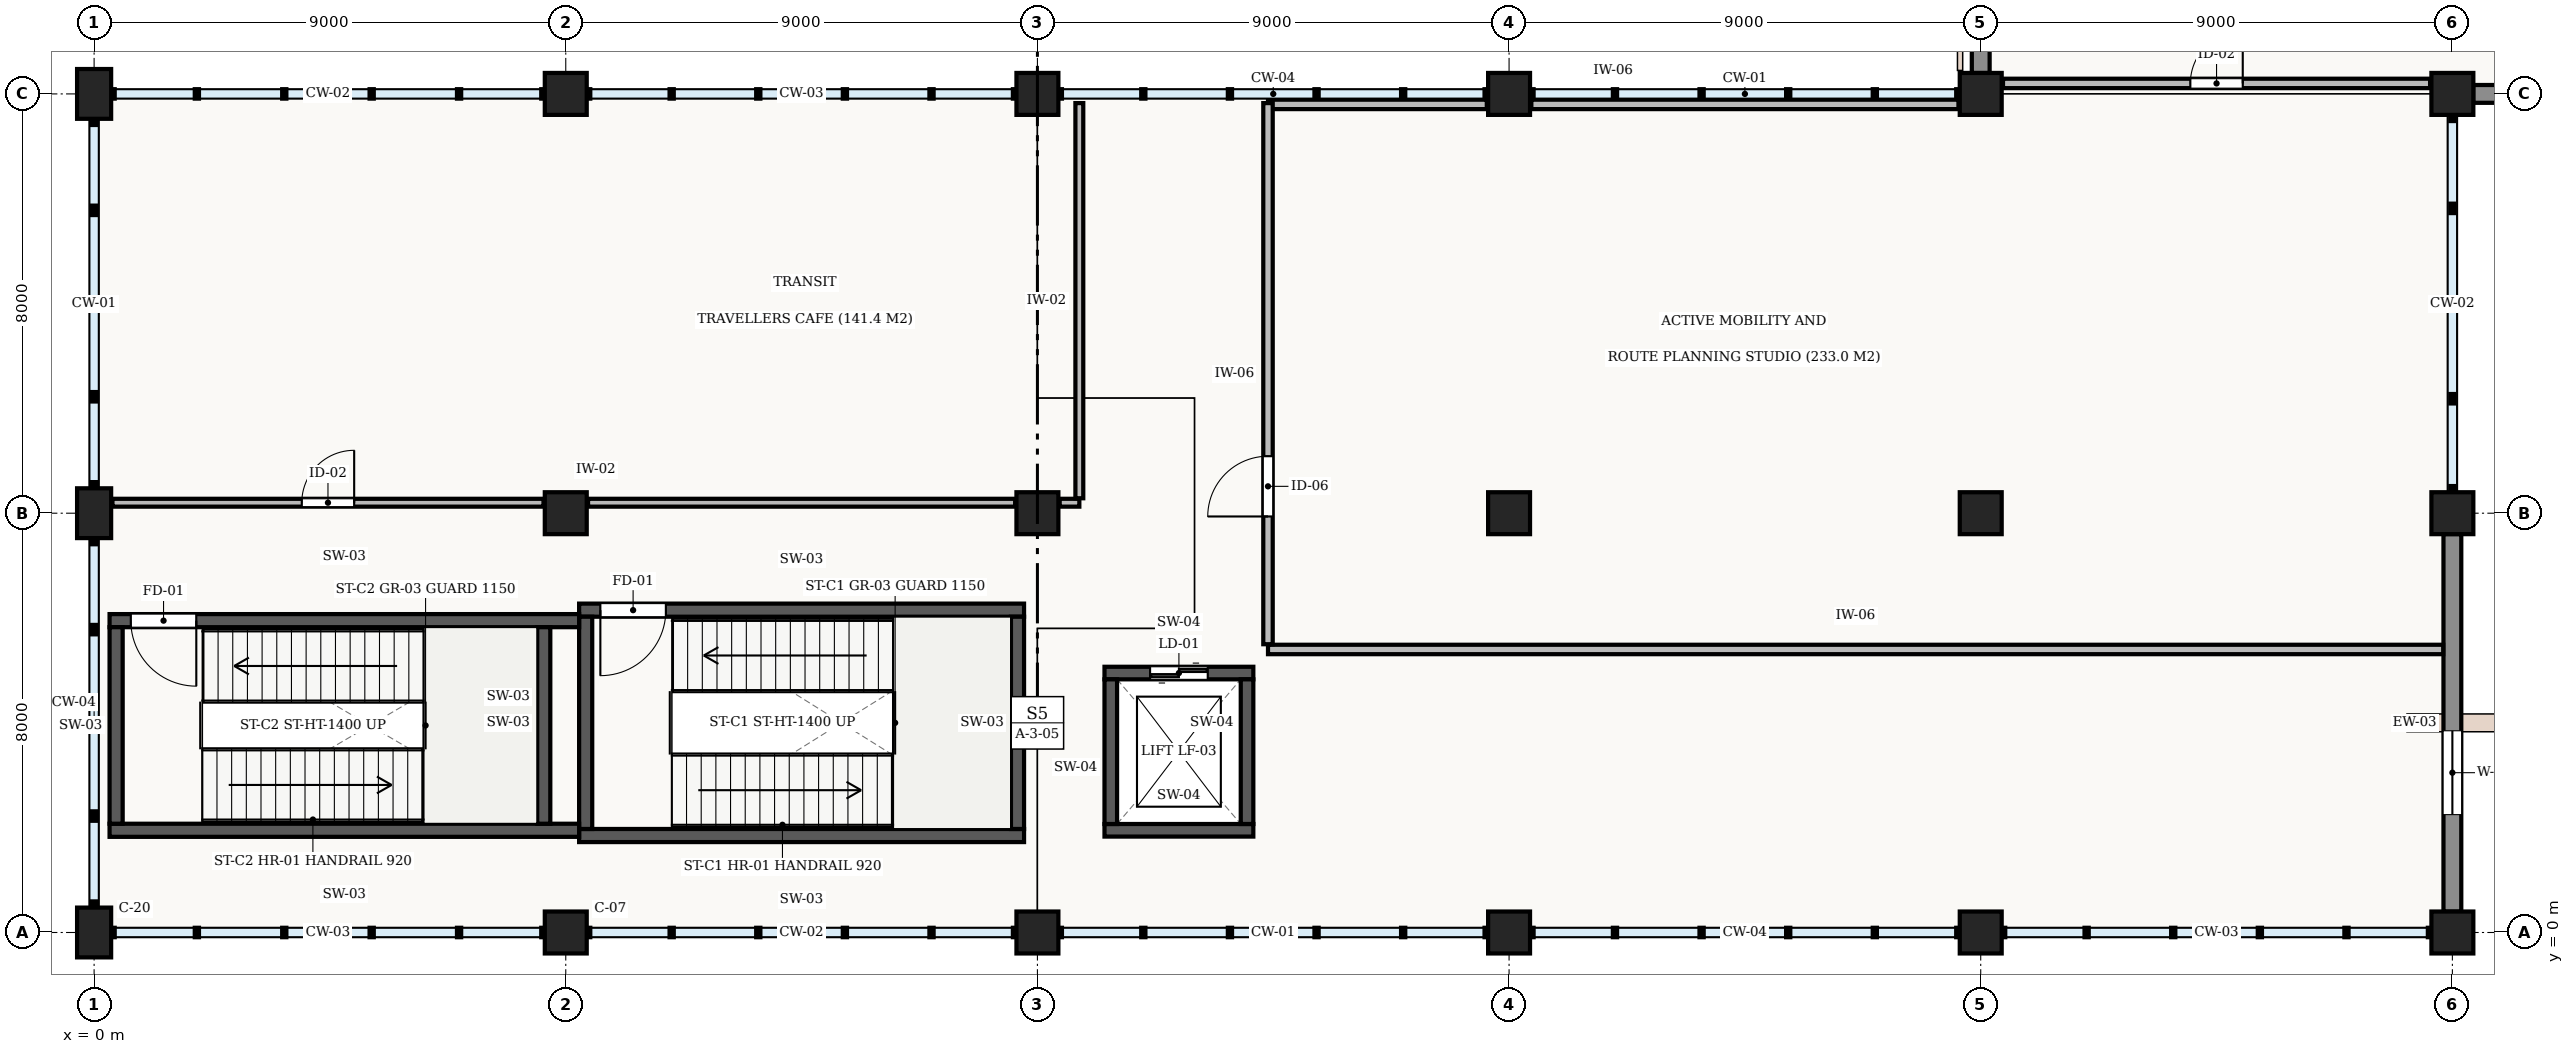
"""IFC4 building model, lengths in metres.
Left out: names, types, materials, properties, quantities, classifications, styles, units other than length and angle.
Written with IfcOpenShell. Run it as: python <this file> out.ifc"""

import sys

from ifc_helpers import new_model, si_unit, direction, frame, frame_2d, origin, origin_2d, place, context, subcontext, project, spatial, rectangle, extrude, element, fill, save


model = new_model("IFC4")
c1 = context("Model", 3, precision=1e-05, world=origin(), true_north=direction((0.0, 1.0)))
c2 = subcontext(c1, "Body", "Model", "MODEL_VIEW")
j1 = project(units=[si_unit("LENGTHUNIT", "METRE"), si_unit("PLANEANGLEUNIT", "RADIAN")], contexts=[c1])
p1 = place(None, origin())
s1 = spatial("IfcSite", under=j1, at=p1, CompositionType="ELEMENT")
p2 = place(p1, origin())
s2 = spatial("IfcBuilding", under=s1, at=p2, CompositionType="ELEMENT")
p3 = place(p2, frame((0.0, 0.0, 5.4)))
s3 = spatial("IfcBuildingStorey", under=s2, at=p3, CompositionType="ELEMENT", Elevation=5.4)
for number, where, z_axis, x_axis in (
    (1, (0.0, 0.0, 0.0), (0.0, 0.0, 1.0), (1.0, 0.0, 0.0)),
    (2, (0.0, 8.0, 0.0), (0.0, 0.0, 1.0), (1.0, 0.0, 0.0)),
    (3, (0.0, 16.0, 0.0), (0.0, 0.0, 1.0), (1.0, 0.0, 0.0)),
):
    element("IfcColumn", number, at=place(p3, frame(where, z_axis=z_axis, x_axis=x_axis)), inside=s3, PredefinedType="COLUMN", context=c2, shape_type="SweptSolid", body=[
        extrude(rectangle(XDim=0.65, YDim=0.95, at=origin_2d()), origin(), (0.0, 0.0, 1.0), 4.8),
    ])
for number, where, z_axis, x_axis in (
    (4, (9.0, 0.0, 0.0), (0.0, 0.0, 1.0), (1.0, 0.0, 0.0)),
    (5, (9.0, 8.0, 0.0), (0.0, 0.0, 1.0), (1.0, 0.0, 0.0)),
    (6, (9.0, 16.0, 0.0), (0.0, 0.0, 1.0), (1.0, 0.0, 0.0)),
    (7, (18.0, 0.0, 0.0), (0.0, 0.0, 1.0), (1.0, 0.0, 0.0)),
    (8, (18.0, 8.0, 0.0), (0.0, 0.0, 1.0), (1.0, 0.0, 0.0)),
    (9, (18.0, 16.0, 0.0), (0.0, 0.0, 1.0), (1.0, 0.0, 0.0)),
    (10, (27.0, 0.0, 0.0), (0.0, 0.0, 1.0), (1.0, 0.0, 0.0)),
    (11, (27.0, 8.0, 0.0), (0.0, 0.0, 1.0), (1.0, 0.0, 0.0)),
    (12, (27.0, 16.0, 0.0), (0.0, 0.0, 1.0), (1.0, 0.0, 0.0)),
    (13, (36.0, 0.0, 0.0), (0.0, 0.0, 1.0), (1.0, 0.0, 0.0)),
    (14, (36.0, 8.0, 0.0), (0.0, 0.0, 1.0), (1.0, 0.0, 0.0)),
    (15, (36.0, 16.0, 0.0), (0.0, 0.0, 1.0), (1.0, 0.0, 0.0)),
    (16, (45.0, 0.0, 0.0), (0.0, 0.0, 1.0), (1.0, 0.0, 0.0)),
    (17, (45.0, 8.0, 0.0), (0.0, 0.0, 1.0), (1.0, 0.0, 0.0)),
    (18, (45.0, 16.0, 0.0), (0.0, 0.0, 1.0), (1.0, 0.0, 0.0)),
):
    element("IfcColumn", number, at=place(p3, frame(where, z_axis=z_axis, x_axis=x_axis)), inside=s3, PredefinedType="COLUMN", context=c2, shape_type="SweptSolid", body=[
        extrude(rectangle(XDim=0.8, YDim=0.8, at=origin_2d()), origin(), (0.0, 0.0, 1.0), 4.8),
    ])
p4 = place(p3, frame((53.602, 16.0, 0.0), z_axis=(0.0, 0.0, 1.0), x_axis=(-1.0, 0.0, 0.0)))
e19 = element("IfcWall", 19, at=p4, inside=s3, PredefinedType="STANDARD", context=c2, shape_type="SweptSolid", body=[
    extrude(rectangle(XDim=8.204, YDim=0.34, at=frame_2d((4.102, 0.0))), origin(), (0.0, 0.0, 1.0), 3.86),
])
p5 = place(p4, frame((1.135, 0.0, 0.9)))
e20 = element("IfcOpeningElement", 20, at=p5, cuts=e19, PredefinedType="OPENING", context=c2, shape_type="SweptSolid", body=[
    extrude(rectangle(XDim=2.4, YDim=1.35, at=frame_2d((1.2, 0.675))), frame((0.0, 0.182, 0.0), z_axis=(0.0, -1.0, 0.0), x_axis=(1.0, 0.0, 0.0)), (0.0, 0.0, 1.0), 0.364),
])
p6 = place(p4, frame((4.669, 0.0, 0.9)))
e21 = element("IfcOpeningElement", 21, at=p6, cuts=e19, PredefinedType="OPENING", context=c2, shape_type="SweptSolid", body=[
    extrude(rectangle(XDim=2.4, YDim=1.35, at=frame_2d((1.2, 0.675))), frame((0.0, 0.182, 0.0), z_axis=(0.0, -1.0, 0.0), x_axis=(1.0, 0.0, 0.0)), (0.0, 0.0, 1.0), 0.364),
])
p7 = place(p3, frame((45.0, 7.602, 0.0), z_axis=(0.0, 0.0, 1.0), x_axis=(0.0, -1.0, 0.0)))
e22 = element("IfcWall", 22, at=p7, inside=s3, PredefinedType="STANDARD", context=c2, shape_type="SweptSolid", body=[
    extrude(rectangle(XDim=7.204, YDim=0.34, at=frame_2d((3.602, 0.0))), origin(), (0.0, 0.0, 1.0), 3.86),
])
p8 = place(p7, frame((3.753, 0.0, 0.9)))
e23 = element("IfcOpeningElement", 23, at=p8, cuts=e22, PredefinedType="OPENING", context=c2, shape_type="SweptSolid", body=[
    extrude(rectangle(XDim=1.6, YDim=2.2, at=frame_2d((0.8, 1.1))), frame((0.0, 0.182, 0.0), z_axis=(0.0, -1.0, 0.0), x_axis=(1.0, 0.0, 0.0)), (0.0, 0.0, 1.0), 0.364),
])
p9 = place(p3, frame((36.0, 16.398, 0.0), z_axis=(0.0, 0.0, 1.0), x_axis=(0.0, 1.0, 0.0)))
e24 = element("IfcWall", 24, at=p9, inside=s3, PredefinedType="STANDARD", context=c2, shape_type="SweptSolid", body=[
    extrude(rectangle(XDim=7.204, YDim=0.34, at=frame_2d((3.602, 0.0))), origin(), (0.0, 0.0, 1.0), 3.86),
])
p10 = place(p9, frame((1.335, 0.0, 0.9)))
e25 = element("IfcOpeningElement", 25, at=p10, cuts=e24, PredefinedType="OPENING", context=c2, shape_type="SweptSolid", body=[
    extrude(rectangle(XDim=1.6, YDim=2.2, at=frame_2d((0.8, 1.1))), frame((0.0, 0.182, 0.0), z_axis=(0.0, -1.0, 0.0), x_axis=(1.0, 0.0, 0.0)), (0.0, 0.0, 1.0), 0.364),
])
p11 = place(p9, frame((4.269, 0.0, 0.9)))
e26 = element("IfcOpeningElement", 26, at=p11, cuts=e24, PredefinedType="OPENING", context=c2, shape_type="SweptSolid", body=[
    extrude(rectangle(XDim=1.6, YDim=2.2, at=frame_2d((0.8, 1.1))), frame((0.0, 0.182, 0.0), z_axis=(0.0, -1.0, 0.0), x_axis=(1.0, 0.0, 0.0)), (0.0, 0.0, 1.0), 0.364),
])
p12 = place(p3, frame((9.255, 1.85, 0.0), z_axis=(0.0, 0.0, 1.0), x_axis=(1.0, 0.0, 0.0)))
e27 = element("IfcWall", 27, at=p12, inside=s3, PredefinedType="SHEAR", context=c2, shape_type="SweptSolid", body=[
    extrude(rectangle(XDim=8.49, YDim=0.25, at=frame_2d((4.245, 0.0))), origin(), (0.0, 0.0, 1.0), 4.48),
])
p13 = place(p3, frame((17.745, 6.15, 0.0), z_axis=(0.0, 0.0, 1.0), x_axis=(-1.0, 0.0, 0.0)))
e28 = element("IfcWall", 28, at=p13, inside=s3, PredefinedType="SHEAR", context=c2, shape_type="SweptSolid", body=[
    extrude(rectangle(XDim=8.49, YDim=0.25, at=frame_2d((4.245, 0.0))), origin(), (0.0, 0.0, 1.0), 4.48),
])
p14 = place(p13, frame((6.835, 0.0, 0.0)))
e29 = element("IfcOpeningElement", 29, at=p14, cuts=e28, PredefinedType="OPENING", context=c2, shape_type="SweptSolid", body=[
    extrude(rectangle(XDim=1.25, YDim=2.15, at=frame_2d((0.625, 1.075))), frame((0.0, 0.137, 0.0), z_axis=(0.0, -1.0, 0.0), x_axis=(1.0, 0.0, 0.0)), (0.0, 0.0, 1.0), 0.274),
])
for number, where, z_axis, x_axis in (
    (30, (9.38, 6.025, 0.0), (0.0, 0.0, 1.0), (0.0, -1.0, 0.0)),
    (31, (17.62, 1.975, 0.0), (0.0, 0.0, 1.0), (0.0, 1.0, 0.0)),
):
    element("IfcWall", number, at=place(p3, frame(where, z_axis=z_axis, x_axis=x_axis)), inside=s3, PredefinedType="SHEAR", context=c2, shape_type="SweptSolid", body=[
        extrude(rectangle(XDim=4.05, YDim=0.25, at=frame_2d((2.025, 0.0))), origin(), (0.0, 0.0, 1.0), 4.48),
    ])
p15 = place(p3, frame((0.295, 1.95, 0.0), z_axis=(0.0, 0.0, 1.0), x_axis=(1.0, 0.0, 0.0)))
e32 = element("IfcWall", 32, at=p15, inside=s3, PredefinedType="SHEAR", context=c2, shape_type="SweptSolid", body=[
    extrude(rectangle(XDim=8.96, YDim=0.25, at=frame_2d((4.48, 0.0))), origin(), (0.0, 0.0, 1.0), 4.48),
])
p16 = place(p3, frame((9.255, 5.95, 0.0), z_axis=(0.0, 0.0, 1.0), x_axis=(-1.0, 0.0, 0.0)))
e33 = element("IfcWall", 33, at=p16, inside=s3, PredefinedType="SHEAR", context=c2, shape_type="SweptSolid", body=[
    extrude(rectangle(XDim=8.96, YDim=0.25, at=frame_2d((4.48, 0.0))), origin(), (0.0, 0.0, 1.0), 4.48),
])
p17 = place(p16, frame((7.305, 0.0, 0.0)))
e34 = element("IfcOpeningElement", 34, at=p17, cuts=e33, PredefinedType="OPENING", context=c2, shape_type="SweptSolid", body=[
    extrude(rectangle(XDim=1.25, YDim=2.15, at=frame_2d((0.625, 1.075))), frame((0.0, 0.137, 0.0), z_axis=(0.0, -1.0, 0.0), x_axis=(1.0, 0.0, 0.0)), (0.0, 0.0, 1.0), 0.274),
])
for number, where, z_axis, x_axis in (
    (35, (0.42, 5.825, 0.0), (0.0, 0.0, 1.0), (0.0, -1.0, 0.0)),
    (36, (8.58, 2.075, 0.0), (0.0, 0.0, 1.0), (0.0, 1.0, 0.0)),
):
    element("IfcWall", number, at=place(p3, frame(where, z_axis=z_axis, x_axis=x_axis)), inside=s3, PredefinedType="SHEAR", context=c2, shape_type="SweptSolid", body=[
        extrude(rectangle(XDim=3.75, YDim=0.25, at=frame_2d((1.875, 0.0))), origin(), (0.0, 0.0, 1.0), 4.48),
    ])
p18 = place(p3, frame((19.28, 1.95, 0.0), z_axis=(0.0, 0.0, 1.0), x_axis=(1.0, 0.0, 0.0)))
e37 = element("IfcWall", 37, at=p18, inside=s3, PredefinedType="SHEAR", context=c2, shape_type="SweptSolid", body=[
    extrude(rectangle(XDim=2.84, YDim=0.24, at=frame_2d((1.42, 0.0))), origin(), (0.0, 0.0, 1.0), 4.48),
])
p19 = place(p3, frame((22.12, 4.95, 0.0), z_axis=(0.0, 0.0, 1.0), x_axis=(-1.0, 0.0, 0.0)))
e38 = element("IfcWall", 38, at=p19, inside=s3, PredefinedType="SHEAR", context=c2, shape_type="SweptSolid", body=[
    extrude(rectangle(XDim=2.84, YDim=0.24, at=frame_2d((1.42, 0.0))), origin(), (0.0, 0.0, 1.0), 4.48),
])
p20 = place(p19, frame((0.87, 0.0, 0.0)))
e39 = element("IfcOpeningElement", 39, at=p20, cuts=e38, PredefinedType="OPENING", context=c2, shape_type="SweptSolid", body=[
    extrude(rectangle(XDim=1.1, YDim=2.2, at=frame_2d((0.55, 1.1))), frame((0.0, 0.132, 0.0), z_axis=(0.0, -1.0, 0.0), x_axis=(1.0, 0.0, 0.0)), (0.0, 0.0, 1.0), 0.264),
])
for number, where, z_axis, x_axis in (
    (40, (19.4, 4.83, 0.0), (0.0, 0.0, 1.0), (0.0, -1.0, 0.0)),
    (41, (22.0, 2.07, 0.0), (0.0, 0.0, 1.0), (0.0, 1.0, 0.0)),
):
    element("IfcWall", number, at=place(p3, frame(where, z_axis=z_axis, x_axis=x_axis)), inside=s3, PredefinedType="SHEAR", context=c2, shape_type="SweptSolid", body=[
        extrude(rectangle(XDim=2.76, YDim=0.24, at=frame_2d((1.38, 0.0))), origin(), (0.0, 0.0, 1.0), 4.48),
    ])
p21 = place(p3, frame((36.425, 16.2, 0.0), z_axis=(0.0, 0.0, 1.0), x_axis=(1.0, 0.0, 0.0)))
e42 = element("IfcWall", 42, at=p21, inside=s3, PredefinedType="STANDARD", context=c2, shape_type="SweptSolid", body=[
    extrude(rectangle(XDim=8.15, YDim=0.18, at=frame_2d((4.075, 0.0))), origin(), (0.0, 0.0, 1.0), 3.82),
])
p22 = place(p21, frame((3.575, 0.0, 0.0)))
e43 = element("IfcOpeningElement", 43, at=p22, cuts=e42, PredefinedType="OPENING", context=c2, shape_type="SweptSolid", body=[
    extrude(rectangle(XDim=1.0, YDim=2.1, at=frame_2d((0.5, 1.05))), frame((0.0, 0.102, 0.0), z_axis=(0.0, -1.0, 0.0), x_axis=(1.0, 0.0, 0.0)), (0.0, 0.0, 1.0), 0.204),
])
p23 = place(p3, frame((0.35, 8.2, 0.0), z_axis=(0.0, 0.0, 1.0), x_axis=(1.0, 0.0, 0.0)))
e44 = element("IfcWall", 44, at=p23, inside=s3, PredefinedType="STANDARD", context=c2, shape_type="SweptSolid", body=[
    extrude(rectangle(XDim=8.225, YDim=0.15, at=frame_2d((4.112, 0.0))), origin(), (0.0, 0.0, 1.0), 3.71),
])
p24 = place(p23, frame((3.613, 0.0, 0.0)))
e45 = element("IfcOpeningElement", 45, at=p24, cuts=e44, PredefinedType="OPENING", context=c2, shape_type="SweptSolid", body=[
    extrude(rectangle(XDim=1.0, YDim=2.1, at=frame_2d((0.5, 1.05))), frame((0.0, 0.087, 0.0), z_axis=(0.0, -1.0, 0.0), x_axis=(1.0, 0.0, 0.0)), (0.0, 0.0, 1.0), 0.174),
])
p25 = place(p3, frame((9.425, 8.2, 0.0), z_axis=(0.0, 0.0, 1.0), x_axis=(1.0, 0.0, 0.0)))
e46 = element("IfcWall", 46, at=p25, inside=s3, PredefinedType="STANDARD", context=c2, shape_type="SweptSolid", body=[
    extrude(rectangle(XDim=8.15, YDim=0.15, at=frame_2d((4.075, 0.0))), origin(), (0.0, 0.0, 1.0), 3.76),
])
p26 = place(p3, frame((18.425, 8.2, 0.0), z_axis=(0.0, 0.0, 1.0), x_axis=(1.0, 0.0, 0.0)))
e47 = element("IfcWall", 47, at=p26, inside=s3, PredefinedType="STANDARD", context=c2, shape_type="SweptSolid", body=[
    extrude(rectangle(XDim=0.375, YDim=0.15, at=frame_2d((0.188, 0.0))), origin(), (0.0, 0.0, 1.0), 4.48),
])
p27 = place(p3, frame((18.8, 8.285, 0.0), z_axis=(0.0, 0.0, 1.0), x_axis=(0.0, 1.0, 0.0)))
e48 = element("IfcWall", 48, at=p27, inside=s3, PredefinedType="STANDARD", context=c2, shape_type="SweptSolid", body=[
    extrude(rectangle(XDim=7.54, YDim=0.15, at=frame_2d((3.77, 0.0))), origin(), (0.0, 0.0, 1.0), 4.48),
])
p28 = place(p3, frame((22.4, 5.4, 0.0), z_axis=(0.0, 0.0, 1.0), x_axis=(1.0, 0.0, 0.0)))
e49 = element("IfcWall", 49, at=p28, inside=s3, PredefinedType="STANDARD", context=c2, shape_type="SweptSolid", body=[
    extrude(rectangle(XDim=22.425, YDim=0.18, at=frame_2d((11.212, 0.0))), origin(), (0.0, 0.0, 1.0), 4.48),
])
p29 = place(p3, frame((22.4, 15.8, 0.0), z_axis=(0.0, 0.0, 1.0), x_axis=(1.0, 0.0, 0.0)))
e50 = element("IfcWall", 50, at=p29, inside=s3, PredefinedType="STANDARD", context=c2, shape_type="SweptSolid", body=[
    extrude(rectangle(XDim=4.175, YDim=0.18, at=frame_2d((2.087, 0.0))), origin(), (0.0, 0.0, 1.0), 4.48),
])
p30 = place(p3, frame((27.425, 15.8, 0.0), z_axis=(0.0, 0.0, 1.0), x_axis=(1.0, 0.0, 0.0)))
e51 = element("IfcWall", 51, at=p30, inside=s3, PredefinedType="STANDARD", context=c2, shape_type="SweptSolid", body=[
    extrude(rectangle(XDim=8.15, YDim=0.18, at=frame_2d((4.075, 0.0))), origin(), (0.0, 0.0, 1.0), 4.48),
])
p31 = place(p3, frame((22.4, 5.5, 0.0), z_axis=(0.0, 0.0, 1.0), x_axis=(0.0, 1.0, 0.0)))
e52 = element("IfcWall", 52, at=p31, inside=s3, PredefinedType="STANDARD", context=c2, shape_type="SweptSolid", body=[
    extrude(rectangle(XDim=10.325, YDim=0.18, at=frame_2d((5.163, 0.0))), origin(), (0.0, 0.0, 1.0), 4.48),
])
p32 = place(p31, frame((2.438, 0.0, 0.0)))
e53 = element("IfcOpeningElement", 53, at=p32, cuts=e52, PredefinedType="OPENING", context=c2, shape_type="SweptSolid", body=[
    extrude(rectangle(XDim=1.15, YDim=2.15, at=frame_2d((0.575, 1.075))), frame((0.0, 0.102, 0.0), z_axis=(0.0, -1.0, 0.0), x_axis=(1.0, 0.0, 0.0)), (0.0, 0.0, 1.0), 0.204),
])
p33 = place(p8, origin())
e54 = element("IfcWindow", 54, at=p33, inside=s3, PartitioningType="SINGLE_PANEL", PredefinedType="WINDOW", context=c2, shape_type="SweptSolid", body=[
    extrude(rectangle(XDim=1.6, YDim=2.2, at=frame_2d((0.8, 1.1))), frame((0.0, 0.03, 0.0), z_axis=(0.0, -1.0, 0.0), x_axis=(1.0, 0.0, 0.0)), (0.0, 0.0, 1.0), 0.06),
])
fill(e23, e54)
p34 = place(p14, origin())
e55 = element("IfcDoor", 55, at=p34, inside=s3, OperationType="SINGLE_SWING_RIGHT", PredefinedType="DOOR", context=c2, shape_type="SweptSolid", body=[
    extrude(rectangle(XDim=1.25, YDim=2.15, at=frame_2d((0.625, 1.075))), frame((0.0, 0.025, 0.0), z_axis=(0.0, -1.0, 0.0), x_axis=(1.0, 0.0, 0.0)), (0.0, 0.0, 1.0), 0.05),
])
fill(e29, e55)
p35 = place(p17, origin())
e56 = element("IfcDoor", 56, at=p35, inside=s3, OperationType="SINGLE_SWING_LEFT", PredefinedType="DOOR", context=c2, shape_type="SweptSolid", body=[
    extrude(rectangle(XDim=1.25, YDim=2.15, at=frame_2d((0.625, 1.075))), frame((0.0, 0.025, 0.0), z_axis=(0.0, -1.0, 0.0), x_axis=(1.0, 0.0, 0.0)), (0.0, 0.0, 1.0), 0.05),
])
fill(e34, e56)
p36 = place(p20, origin())
e57 = element("IfcDoor", 57, at=p36, inside=s3, OperationType="DOUBLE_DOOR_SLIDING", PredefinedType="DOOR", context=c2, shape_type="SweptSolid", body=[
    extrude(rectangle(XDim=1.1, YDim=2.2, at=frame_2d((0.55, 1.1))), frame((0.0, 0.025, 0.0), z_axis=(0.0, -1.0, 0.0), x_axis=(1.0, 0.0, 0.0)), (0.0, 0.0, 1.0), 0.05),
])
fill(e39, e57)
p37 = place(p22, origin())
e58 = element("IfcDoor", 58, at=p37, inside=s3, OperationType="SINGLE_SWING_RIGHT", PredefinedType="DOOR", context=c2, shape_type="SweptSolid", body=[
    extrude(rectangle(XDim=1.0, YDim=2.1, at=frame_2d((0.5, 1.05))), frame((0.0, 0.025, 0.0), z_axis=(0.0, -1.0, 0.0), x_axis=(1.0, 0.0, 0.0)), (0.0, 0.0, 1.0), 0.05),
])
fill(e43, e58)
p38 = place(p24, origin())
e59 = element("IfcDoor", 59, at=p38, inside=s3, OperationType="SINGLE_SWING_RIGHT", PredefinedType="DOOR", context=c2, shape_type="SweptSolid", body=[
    extrude(rectangle(XDim=1.0, YDim=2.1, at=frame_2d((0.5, 1.05))), frame((0.0, 0.025, 0.0), z_axis=(0.0, -1.0, 0.0), x_axis=(1.0, 0.0, 0.0)), (0.0, 0.0, 1.0), 0.05),
])
fill(e45, e59)
p39 = place(p32, origin())
e60 = element("IfcDoor", 60, at=p39, inside=s3, OperationType="SINGLE_SWING_LEFT", PredefinedType="DOOR", context=c2, shape_type="SweptSolid", body=[
    extrude(rectangle(XDim=1.15, YDim=2.15, at=frame_2d((0.575, 1.075))), frame((0.0, 0.025, 0.0), z_axis=(0.0, -1.0, 0.0), x_axis=(1.0, 0.0, 0.0)), (0.0, 0.0, 1.0), 0.05),
])
fill(e53, e60)
save(model, sys.argv[1])
